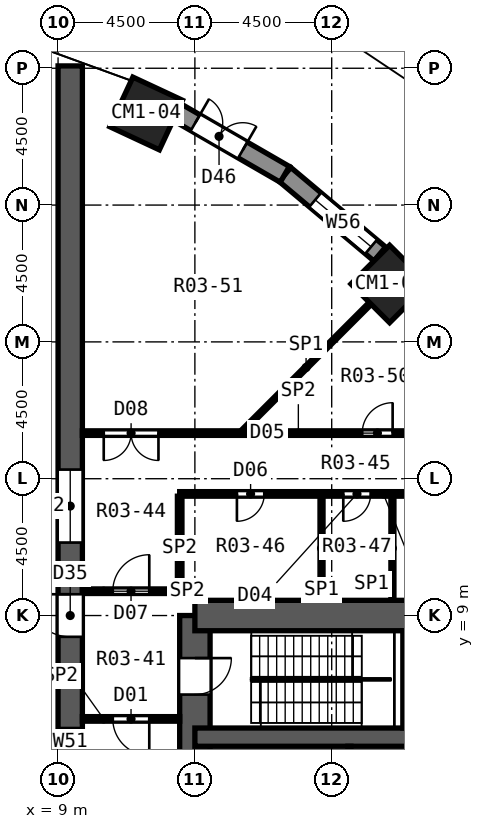
"""IFC4 building model, lengths in metres.
Left out: names, types, materials, properties, quantities, classifications, styles, units other than length and angle.
Written with IfcOpenShell. Run it as: python <this file> out.ifc"""

import sys

from ifc_helpers import new_model, si_unit, direction, frame, frame_2d, origin, origin_2d, place, context, subcontext, project, spatial, polyline, rectangle, outline, extrude, element, fill, save


model = new_model("IFC4")
c1 = context("Model", 3, precision=1e-05, world=origin(), true_north=direction((0.0, 1.0)))
c2 = subcontext(c1, "Body", "Model", "MODEL_VIEW")
j1 = project(units=[si_unit("LENGTHUNIT", "METRE"), si_unit("PLANEANGLEUNIT", "RADIAN")], contexts=[c1])
p1 = place(None, origin())
s1 = spatial("IfcSite", under=j1, at=p1, CompositionType="ELEMENT")
p2 = place(p1, origin())
s2 = spatial("IfcBuilding", under=s1, at=p2, CompositionType="ELEMENT")
p3 = place(p2, origin())
s3 = spatial("IfcBuildingStorey", under=s2, at=p3, CompositionType="ELEMENT", Elevation=0.0)
for number, where, z_axis, x_axis in (
    (1, (19.905, 19.905, 0.0), (0.0, 0.0, 1.0), (0.707, 0.707, 0.0)),
    (2, (11.897, 25.512, 0.0), (0.0, 0.0, 1.0), (0.423, 0.906, 0.0)),
):
    element("IfcColumn", number, at=place(p3, frame(where, z_axis=z_axis, x_axis=x_axis)), inside=s3, PredefinedType="COLUMN", context=c2, shape_type="SweptSolid", body=[
        extrude(rectangle(XDim=1.8, YDim=1.8, at=origin_2d()), origin(), (0.0, 0.0, 1.0), 5.0),
    ])
p4 = place(p3, frame((13.5, -9.0, 0.0), z_axis=(0.0, 0.0, 1.0), x_axis=(0.0, 1.0, 0.0)))
e3 = element("IfcWall", 3, at=p4, inside=s3, PredefinedType="SHEAR", context=c2, shape_type="SweptSolid", body=[
    extrude(rectangle(XDim=18.0, YDim=1.0, at=frame_2d((9.0, 0.0))), origin(), (0.0, 0.0, 1.0), 5.0),
])
p5 = place(p4, frame((15.4, 0.0, 0.0)))
e4 = element("IfcOpeningElement", 4, at=p5, cuts=e3, PredefinedType="OPENING", context=c2, shape_type="SweptSolid", body=[
    extrude(rectangle(XDim=1.2, YDim=2.1, at=frame_2d((0.6, 1.05))), frame((0.0, 0.512, 0.0), z_axis=(0.0, -1.0, 0.0), x_axis=(1.0, 0.0, 0.0)), (0.0, 0.0, 1.0), 1.024),
])
p6 = place(p4, frame((1.4, 0.0, 0.0)))
e5 = element("IfcOpeningElement", 5, at=p6, cuts=e3, PredefinedType="OPENING", context=c2, shape_type="SweptSolid", body=[
    extrude(rectangle(XDim=1.2, YDim=2.1, at=frame_2d((0.6, 1.05))), frame((0.0, 0.512, 0.0), z_axis=(0.0, -1.0, 0.0), x_axis=(1.0, 0.0, 0.0)), (0.0, 0.0, 1.0), 1.024),
])
p7 = place(p4, frame((7.5, 0.0, 0.0)))
e6 = element("IfcOpeningElement", 6, at=p7, cuts=e3, PredefinedType="OPENING", context=c2, shape_type="SweptSolid", body=[
    extrude(rectangle(XDim=3.0, YDim=2.4, at=frame_2d((1.5, 1.2))), frame((0.0, 0.512, 0.0), z_axis=(0.0, -1.0, 0.0), x_axis=(1.0, 0.0, 0.0)), (0.0, 0.0, 1.0), 1.024),
])
p8 = place(p3, frame((13.5, 9.0, 0.0), z_axis=(0.0, 0.0, 1.0), x_axis=(1.0, 0.0, 0.0)))
e7 = element("IfcWall", 7, at=p8, inside=s3, PredefinedType="SHEAR", context=c2, shape_type="SweptSolid", body=[
    extrude(rectangle(XDim=12.4, YDim=1.0, at=frame_2d((6.2, 0.0))), origin(), (0.0, 0.0, 1.0), 5.0),
])
p9 = place(p3, frame((13.5, 5.0, 0.0), z_axis=(0.0, 0.0, 1.0), x_axis=(1.0, 0.0, 0.0)))
e8 = element("IfcWall", 8, at=p9, inside=s3, PredefinedType="SHEAR", context=c2, shape_type="SweptSolid", body=[
    extrude(rectangle(XDim=12.4, YDim=0.6, at=frame_2d((6.2, 0.0))), origin(), (0.0, 0.0, 1.0), 5.0),
])
p10 = place(p9, frame((9.74, 0.0, 0.0)))
e9 = element("IfcOpeningElement", 9, at=p10, cuts=e8, PredefinedType="OPENING", context=c2, shape_type="SweptSolid", body=[
    extrude(rectangle(XDim=0.9, YDim=2.1, at=frame_2d((0.45, 1.05))), frame((0.0, 0.312, 0.0), z_axis=(0.0, -1.0, 0.0), x_axis=(1.0, 0.0, 0.0)), (0.0, 0.0, 1.0), 0.624),
])
p11 = place(p3, frame((9.4, -27.077, 0.0), z_axis=(0.0, 0.0, 1.0), x_axis=(0.0, 1.0, 0.0)))
e10 = element("IfcWall", 10, at=p11, inside=s3, PredefinedType="SHEAR", context=c2, shape_type="SweptSolid", body=[
    extrude(rectangle(XDim=54.154, YDim=0.8, at=frame_2d((27.077, 0.0))), origin(), (0.0, 0.0, 1.0), 5.0),
])
p12 = place(p11, frame((18.877, 0.0, 0.0)))
e11 = element("IfcOpeningElement", 11, at=p12, cuts=e10, PredefinedType="OPENING", context=c2, shape_type="SweptSolid", body=[
    extrude(rectangle(XDim=1.4, YDim=2.1, at=frame_2d((0.7, 1.05))), frame((0.0, 0.412, 0.0), z_axis=(0.0, -1.0, 0.0), x_axis=(1.0, 0.0, 0.0)), (0.0, 0.0, 1.0), 0.824),
])
p13 = place(p11, frame((22.677, 0.0, 0.3)))
e12 = element("IfcOpeningElement", 12, at=p13, cuts=e10, PredefinedType="OPENING", context=c2, shape_type="SweptSolid", body=[
    extrude(rectangle(XDim=2.4, YDim=2.1, at=frame_2d((1.2, 1.05))), frame((0.0, 0.412, 0.0), z_axis=(0.0, -1.0, 0.0), x_axis=(1.0, 0.0, 0.0)), (0.0, 0.0, 1.0), 0.824),
])
p14 = place(p11, frame((28.377, 0.0, 0.0)))
e13 = element("IfcOpeningElement", 13, at=p14, cuts=e10, PredefinedType="OPENING", context=c2, shape_type="SweptSolid", body=[
    extrude(rectangle(XDim=1.4, YDim=2.1, at=frame_2d((0.7, 1.05))), frame((0.0, 0.412, 0.0), z_axis=(0.0, -1.0, 0.0), x_axis=(1.0, 0.0, 0.0)), (0.0, 0.0, 1.0), 0.824),
])
p15 = place(p11, frame((29.977, 0.0, 0.3)))
e14 = element("IfcOpeningElement", 14, at=p15, cuts=e10, PredefinedType="OPENING", context=c2, shape_type="SweptSolid", body=[
    extrude(rectangle(XDim=2.4, YDim=2.1, at=frame_2d((1.2, 1.05))), frame((0.0, 0.412, 0.0), z_axis=(0.0, -1.0, 0.0), x_axis=(1.0, 0.0, 0.0)), (0.0, 0.0, 1.0), 0.824),
])
p16 = place(p11, frame((35.377, 0.0, 0.0)))
e15 = element("IfcOpeningElement", 15, at=p16, cuts=e10, PredefinedType="OPENING", context=c2, shape_type="SweptSolid", body=[
    extrude(rectangle(XDim=1.4, YDim=2.1, at=frame_2d((0.7, 1.05))), frame((0.0, 0.412, 0.0), z_axis=(0.0, -1.0, 0.0), x_axis=(1.0, 0.0, 0.0)), (0.0, 0.0, 1.0), 0.824),
])
p17 = place(p11, frame((38.477, 0.0, 0.3)))
e16 = element("IfcOpeningElement", 16, at=p17, cuts=e10, PredefinedType="OPENING", context=c2, shape_type="SweptSolid", body=[
    extrude(rectangle(XDim=2.4, YDim=2.1, at=frame_2d((1.2, 1.05))), frame((0.0, 0.412, 0.0), z_axis=(0.0, -1.0, 0.0), x_axis=(1.0, 0.0, 0.0)), (0.0, 0.0, 1.0), 0.824),
])
p18 = place(p11, frame((13.177, 0.0, 0.0)))
e17 = element("IfcOpeningElement", 17, at=p18, cuts=e10, PredefinedType="OPENING", context=c2, shape_type="SweptSolid", body=[
    extrude(rectangle(XDim=1.0, YDim=2.1, at=frame_2d((0.5, 1.05))), frame((0.0, 0.412, 0.0), z_axis=(0.0, -1.0, 0.0), x_axis=(1.0, 0.0, 0.0)), (0.0, 0.0, 1.0), 0.824),
])
p19 = place(p3, frame((19.581, 20.891, 0.0), z_axis=(0.0, 0.0, 1.0), x_axis=(-0.766033337734, 0.642800844336, 0.0)))
e18 = element("IfcWall", 18, at=p19, inside=s3, PredefinedType="SOLIDWALL", context=c2, shape_type="SweptSolid", body=[
    extrude(rectangle(XDim=4.069, YDim=0.6, at=frame_2d((2.035, 0.0))), origin(), (0.0, 0.0, 1.0), 4.45),
])
p20 = place(p19, frame((0.372, 0.0, 0.3)))
e19 = element("IfcOpeningElement", 19, at=p20, cuts=e18, PredefinedType="OPENING", context=c2, shape_type="SweptSolid", body=[
    extrude(rectangle(XDim=2.4, YDim=2.1, at=frame_2d((1.2, 1.05))), frame((0.0, 0.312, 0.0), z_axis=(0.0, -1.0, 0.0), x_axis=(1.0, 0.0, 0.0)), (0.0, 0.0, 1.0), 0.624),
])
p21 = place(p3, frame((16.458, 23.51, 0.0), z_axis=(0.0, 0.0, 1.0), x_axis=(-0.866011732453, 0.500023678693, 0.0)))
e20 = element("IfcWall", 20, at=p21, inside=s3, PredefinedType="SOLIDWALL", context=c2, shape_type="SweptSolid", body=[
    extrude(rectangle(XDim=4.069, YDim=0.6, at=frame_2d((2.035, 0.0))), origin(), (0.0, 0.0, 1.0), 4.45),
])
p22 = place(p21, frame((1.597, 0.0, 0.0)))
e21 = element("IfcOpeningElement", 21, at=p22, cuts=e20, PredefinedType="OPENING", context=c2, shape_type="SweptSolid", body=[
    extrude(rectangle(XDim=1.8, YDim=2.1, at=frame_2d((0.9, 1.05))), frame((0.0, 0.312, 0.0), z_axis=(0.0, -1.0, 0.0), x_axis=(1.0, 0.0, 0.0)), (0.0, 0.0, 1.0), 0.624),
])
p23 = place(p3, frame((11.641, 26.507, 0.0), z_axis=(0.342028363555, 0.939687527149, 0.001987421433), x_axis=(-0.00066157174, -0.001874177487, 0.999998024889)))
e22 = element("IfcWall", 22, at=p23, inside=s3, PredefinedType="SOLIDWALL", context=c2, shape_type="SweptSolid", body=[
    extrude(outline(polyline([(0.0, 0.0), (4.45, -5.421e-19), (4.45, -2.81), (-5.446e-05, -2.81), (0.0, 0.0)])), origin(), (0.0, 0.0, -1.0), 0.38),
])
p24 = place(p3, frame((9.8, 5.6, 0.0), z_axis=(0.0, 0.0, 1.0), x_axis=(1.0, 0.0, 0.0)))
e23 = element("IfcWall", 23, at=p24, inside=s3, PredefinedType="PARTITIONING", context=c2, shape_type="SweptSolid", body=[
    extrude(rectangle(XDim=3.2, YDim=0.15, at=frame_2d((1.6, 0.0))), origin(), (0.0, 0.0, 1.0), 4.45),
])
p25 = place(p24, frame((1.0, 0.0, 0.0)))
e24 = element("IfcOpeningElement", 24, at=p25, cuts=e23, PredefinedType="OPENING", context=c2, shape_type="SweptSolid", body=[
    extrude(rectangle(XDim=1.2, YDim=2.1, at=frame_2d((0.6, 1.05))), frame((0.0, 0.087, 0.0), z_axis=(0.0, -1.0, 0.0), x_axis=(1.0, 0.0, 0.0)), (0.0, 0.0, 1.0), 0.174),
])
p26 = place(p3, frame((9.8, 9.8, 0.0), z_axis=(0.0, 0.0, 1.0), x_axis=(1.0, 0.0, 0.0)))
e25 = element("IfcWall", 25, at=p26, inside=s3, PredefinedType="PARTITIONING", context=c2, shape_type="SweptSolid", body=[
    extrude(rectangle(XDim=3.125, YDim=0.15, at=frame_2d((1.562, 0.0))), origin(), (0.0, 0.0, 1.0), 4.45),
])
p27 = place(p26, frame((1.0, 0.0, 0.0)))
e26 = element("IfcOpeningElement", 26, at=p27, cuts=e25, PredefinedType="OPENING", context=c2, shape_type="SweptSolid", body=[
    extrude(rectangle(XDim=1.2, YDim=2.1, at=frame_2d((0.6, 1.05))), frame((0.0, 0.087, 0.0), z_axis=(0.0, -1.0, 0.0), x_axis=(1.0, 0.0, 0.0)), (0.0, 0.0, 1.0), 0.174),
])
p28 = place(p3, frame((13.0, 13.0, 0.0), z_axis=(0.0, 0.0, 1.0), x_axis=(1.0, 0.0, 0.0)))
e27 = element("IfcWall", 27, at=p28, inside=s3, PredefinedType="PARTITIONING", context=c2, shape_type="SweptSolid", body=[
    extrude(rectangle(XDim=12.16, YDim=0.15, at=frame_2d((6.08, 0.0))), origin(), (0.0, 0.0, 1.0), 4.45),
])
p29 = place(p28, frame((10.385, 0.0, 0.0)))
e28 = element("IfcOpeningElement", 28, at=p29, cuts=e27, PredefinedType="OPENING", context=c2, shape_type="SweptSolid", body=[
    extrude(rectangle(XDim=0.9, YDim=2.1, at=frame_2d((0.45, 1.05))), frame((0.0, 0.087, 0.0), z_axis=(0.0, -1.0, 0.0), x_axis=(1.0, 0.0, 0.0)), (0.0, 0.0, 1.0), 0.174),
])
p30 = place(p28, frame((7.803, 0.0, 0.0)))
e29 = element("IfcOpeningElement", 29, at=p30, cuts=e27, PredefinedType="OPENING", context=c2, shape_type="SweptSolid", body=[
    extrude(rectangle(XDim=0.9, YDim=2.1, at=frame_2d((0.45, 1.05))), frame((0.0, 0.087, 0.0), z_axis=(0.0, -1.0, 0.0), x_axis=(1.0, 0.0, 0.0)), (0.0, 0.0, 1.0), 0.174),
])
p31 = place(p28, frame((5.381, 0.0, 0.0)))
e30 = element("IfcOpeningElement", 30, at=p31, cuts=e27, PredefinedType="OPENING", context=c2, shape_type="SweptSolid", body=[
    extrude(rectangle(XDim=0.9, YDim=2.1, at=frame_2d((0.45, 1.05))), frame((0.0, 0.087, 0.0), z_axis=(0.0, -1.0, 0.0), x_axis=(1.0, 0.0, 0.0)), (0.0, 0.0, 1.0), 0.174),
])
p32 = place(p28, frame((1.883, 0.0, 0.0)))
e31 = element("IfcOpeningElement", 31, at=p32, cuts=e27, PredefinedType="OPENING", context=c2, shape_type="SweptSolid", body=[
    extrude(rectangle(XDim=0.9, YDim=2.1, at=frame_2d((0.45, 1.05))), frame((0.0, 0.087, 0.0), z_axis=(0.0, -1.0, 0.0), x_axis=(1.0, 0.0, 0.0)), (0.0, 0.0, 1.0), 0.174),
])
p33 = place(p3, frame((9.8, 15.0, 0.0), z_axis=(0.0, 0.0, 1.0), x_axis=(1.0, 0.0, 0.0)))
e32 = element("IfcWall", 32, at=p33, inside=s3, PredefinedType="PARTITIONING", context=c2, shape_type="SweptSolid", body=[
    extrude(rectangle(XDim=14.206, YDim=0.15, at=frame_2d((7.103, 0.0))), origin(), (0.0, 0.0, 1.0), 4.45),
])
p34 = place(p33, frame((9.204, 0.0, 0.0)))
e33 = element("IfcOpeningElement", 33, at=p34, cuts=e32, PredefinedType="OPENING", context=c2, shape_type="SweptSolid", body=[
    extrude(rectangle(XDim=1.0, YDim=2.1, at=frame_2d((0.5, 1.05))), frame((0.0, 0.087, 0.0), z_axis=(0.0, -1.0, 0.0), x_axis=(1.0, 0.0, 0.0)), (0.0, 0.0, 1.0), 0.174),
])
p35 = place(p33, frame((0.702, 0.0, 0.0)))
e34 = element("IfcOpeningElement", 34, at=p35, cuts=e32, PredefinedType="OPENING", context=c2, shape_type="SweptSolid", body=[
    extrude(rectangle(XDim=1.8, YDim=2.1, at=frame_2d((0.9, 1.05))), frame((0.0, 0.087, 0.0), z_axis=(0.0, -1.0, 0.0), x_axis=(1.0, 0.0, 0.0)), (0.0, 0.0, 1.0), 0.174),
])
p36 = place(p3, frame((15.053, 15.053, 0.0), z_axis=(0.0, 0.0, 1.0), x_axis=(0.707106781187, 0.707106781187, 0.0)))
e35 = element("IfcWall", 35, at=p36, inside=s3, PredefinedType="PARTITIONING", context=c2, shape_type="SweptSolid", body=[
    extrude(rectangle(XDim=5.952, YDim=0.1, at=frame_2d((2.976, 0.0))), origin(), (0.0, 0.0, 1.0), 4.45),
])
for number, where, z_axis, x_axis in (
    (36, (19.997, 9.5, 0.0), (0.0, 0.0, 1.0), (0.0, 1.0, 0.0)),
    (37, (17.665, 9.5, 0.0), (0.0, 0.0, 1.0), (0.0, 1.0, 0.0)),
):
    element("IfcWall", number, at=place(p3, frame(where, z_axis=z_axis, x_axis=x_axis)), inside=s3, PredefinedType="PARTITIONING", context=c2, shape_type="SweptSolid", body=[
        extrude(rectangle(XDim=3.425, YDim=0.1, at=frame_2d((1.712, 0.0))), origin(), (0.0, 0.0, 1.0), 4.45),
    ])
p37 = place(p3, frame((13.0, 9.5, 0.0), z_axis=(0.0, 0.0, 1.0), x_axis=(0.0, 1.0, 0.0)))
e38 = element("IfcWall", 38, at=p37, inside=s3, PredefinedType="PARTITIONING", context=c2, shape_type="SweptSolid", body=[
    extrude(rectangle(XDim=3.425, YDim=0.15, at=frame_2d((1.712, 0.0))), origin(), (0.0, 0.0, 1.0), 4.45),
])
p38 = place(p3, frame((18.583, 2.3, 0.0), z_axis=(0.0, 0.0, 1.0), x_axis=(0.0, 1.0, 0.0)))
e39 = element("IfcWall", 39, at=p38, inside=s3, PredefinedType="PARTITIONING", context=c2, shape_type="SweptSolid", body=[
    extrude(rectangle(XDim=2.4, YDim=0.1, at=frame_2d((1.2, 0.0))), origin(), (0.0, 0.0, 1.0), 4.45),
])
p39 = place(p3, frame((20.39, 5.3, 0.0), z_axis=(0.0, 0.0, 1.0), x_axis=(0.0, 1.0, 0.0)))
e40 = element("IfcWall", 40, at=p39, inside=s3, PredefinedType="PARTITIONING", context=c2, shape_type="SweptSolid", body=[
    extrude(rectangle(XDim=3.2, YDim=0.1, at=frame_2d((1.6, 0.0))), origin(), (0.0, 0.0, 1.0), 4.45),
])
p40 = place(p25, frame((1.2, 0.0, 0.0), z_axis=(0.0, 0.0, 1.0), x_axis=(-1.0, 0.0, 0.0)))
e41 = element("IfcDoor", 41, at=p40, inside=s3, OperationType="SINGLE_SWING_LEFT", PredefinedType="DOOR", context=c2, shape_type="SweptSolid", body=[
    extrude(rectangle(XDim=1.2, YDim=2.1, at=frame_2d((0.6, 1.05))), frame((0.0, 0.025, 0.0), z_axis=(0.0, -1.0, 0.0), x_axis=(1.0, 0.0, 0.0)), (0.0, 0.0, 1.0), 0.05),
])
fill(e24, e41)
p41 = place(p31, frame((0.9, 0.0, 0.0), z_axis=(0.0, 0.0, 1.0), x_axis=(-1.0, 0.0, 0.0)))
e42 = element("IfcDoor", 42, at=p41, inside=s3, OperationType="SINGLE_SWING_RIGHT", PredefinedType="DOOR", context=c2, shape_type="SweptSolid", body=[
    extrude(rectangle(XDim=0.9, YDim=2.1, at=frame_2d((0.45, 1.05))), frame((0.0, 0.025, 0.0), z_axis=(0.0, -1.0, 0.0), x_axis=(1.0, 0.0, 0.0)), (0.0, 0.0, 1.0), 0.05),
])
fill(e30, e42)
p42 = place(p34, origin())
e43 = element("IfcDoor", 43, at=p42, inside=s3, OperationType="SINGLE_SWING_RIGHT", PredefinedType="DOOR", context=c2, shape_type="SweptSolid", body=[
    extrude(rectangle(XDim=1.0, YDim=2.1, at=frame_2d((0.5, 1.05))), frame((0.0, 0.025, 0.0), z_axis=(0.0, -1.0, 0.0), x_axis=(1.0, 0.0, 0.0)), (0.0, 0.0, 1.0), 0.05),
])
fill(e33, e43)
p43 = place(p32, frame((0.9, 0.0, 0.0), z_axis=(0.0, 0.0, 1.0), x_axis=(-1.0, 0.0, 0.0)))
e44 = element("IfcDoor", 44, at=p43, inside=s3, OperationType="SINGLE_SWING_RIGHT", PredefinedType="DOOR", context=c2, shape_type="SweptSolid", body=[
    extrude(rectangle(XDim=0.9, YDim=2.1, at=frame_2d((0.45, 1.05))), frame((0.0, 0.025, 0.0), z_axis=(0.0, -1.0, 0.0), x_axis=(1.0, 0.0, 0.0)), (0.0, 0.0, 1.0), 0.05),
])
fill(e31, e44)
p44 = place(p27, origin())
e45 = element("IfcDoor", 45, at=p44, inside=s3, OperationType="SINGLE_SWING_RIGHT", PredefinedType="DOOR", context=c2, shape_type="SweptSolid", body=[
    extrude(rectangle(XDim=1.2, YDim=2.1, at=frame_2d((0.6, 1.05))), frame((0.0, 0.025, 0.0), z_axis=(0.0, -1.0, 0.0), x_axis=(1.0, 0.0, 0.0)), (0.0, 0.0, 1.0), 0.05),
])
fill(e26, e45)
p45 = place(p35, frame((1.8, 0.0, 0.0), z_axis=(0.0, 0.0, 1.0), x_axis=(-1.0, 0.0, 0.0)))
e46 = element("IfcDoor", 46, at=p45, inside=s3, OperationType="DOUBLE_DOOR_SINGLE_SWING", PredefinedType="DOOR", context=c2, shape_type="SweptSolid", body=[
    extrude(rectangle(XDim=1.8, YDim=2.1, at=frame_2d((0.9, 1.05))), frame((0.0, 0.025, 0.0), z_axis=(0.0, -1.0, 0.0), x_axis=(1.0, 0.0, 0.0)), (0.0, 0.0, 1.0), 0.05),
])
fill(e34, e46)
p46 = place(p15, origin())
e47 = element("IfcWindow", 47, at=p46, inside=s3, PartitioningType="SINGLE_PANEL", PredefinedType="WINDOW", context=c2, shape_type="SweptSolid", body=[
    extrude(rectangle(XDim=2.4, YDim=2.1, at=frame_2d((1.2, 1.05))), frame((0.0, 0.03, 0.0), z_axis=(0.0, -1.0, 0.0), x_axis=(1.0, 0.0, 0.0)), (0.0, 0.0, 1.0), 0.06),
])
fill(e14, e47)
p47 = place(p16, origin())
e48 = element("IfcDoor", 48, at=p47, inside=s3, OperationType="SINGLE_SWING_RIGHT", PredefinedType="DOOR", context=c2, shape_type="SweptSolid", body=[
    extrude(rectangle(XDim=1.4, YDim=2.1, at=frame_2d((0.7, 1.05))), frame((0.0, 0.025, 0.0), z_axis=(0.0, -1.0, 0.0), x_axis=(1.0, 0.0, 0.0)), (0.0, 0.0, 1.0), 0.05),
])
fill(e15, e48)
p48 = place(p17, origin())
e49 = element("IfcWindow", 49, at=p48, inside=s3, PartitioningType="SINGLE_PANEL", PredefinedType="WINDOW", context=c2, shape_type="SweptSolid", body=[
    extrude(rectangle(XDim=2.4, YDim=2.1, at=frame_2d((1.2, 1.05))), frame((0.0, 0.03, 0.0), z_axis=(0.0, -1.0, 0.0), x_axis=(1.0, 0.0, 0.0)), (0.0, 0.0, 1.0), 0.06),
])
fill(e16, e49)
p49 = place(p22, frame((1.8, 0.0, 0.0), z_axis=(0.0, 0.0, 1.0), x_axis=(-1.0, 0.0, 0.0)))
e50 = element("IfcDoor", 50, at=p49, inside=s3, OperationType="DOUBLE_DOOR_SINGLE_SWING", PredefinedType="DOOR", context=c2, shape_type="SweptSolid", body=[
    extrude(rectangle(XDim=1.8, YDim=2.1, at=frame_2d((0.9, 1.05))), frame((0.0, 0.025, 0.0), z_axis=(0.0, -1.0, 0.0), x_axis=(1.0, 0.0, 0.0)), (0.0, 0.0, 1.0), 0.05),
])
fill(e21, e50)
p50 = place(p20, origin())
e51 = element("IfcWindow", 51, at=p50, inside=s3, PartitioningType="SINGLE_PANEL", PredefinedType="WINDOW", context=c2, shape_type="SweptSolid", body=[
    extrude(rectangle(XDim=2.4, YDim=2.1, at=frame_2d((1.2, 1.05))), frame((0.0, 0.03, 0.0), z_axis=(0.0, -1.0, 0.0), x_axis=(1.0, 0.0, 0.0)), (0.0, 0.0, 1.0), 0.06),
])
fill(e19, e51)
p51 = place(p5, frame((1.2, 0.0, 0.0), z_axis=(0.0, 0.0, 1.0), x_axis=(-1.0, 0.0, 0.0)))
e52 = element("IfcDoor", 52, at=p51, inside=s3, OperationType="SINGLE_SWING_LEFT", PredefinedType="DOOR", context=c2, shape_type="SweptSolid", body=[
    extrude(rectangle(XDim=1.2, YDim=2.1, at=frame_2d((0.6, 1.05))), frame((0.0, 0.025, 0.0), z_axis=(0.0, -1.0, 0.0), x_axis=(1.0, 0.0, 0.0)), (0.0, 0.0, 1.0), 0.05),
])
fill(e4, e52)
save(model, sys.argv[1])
